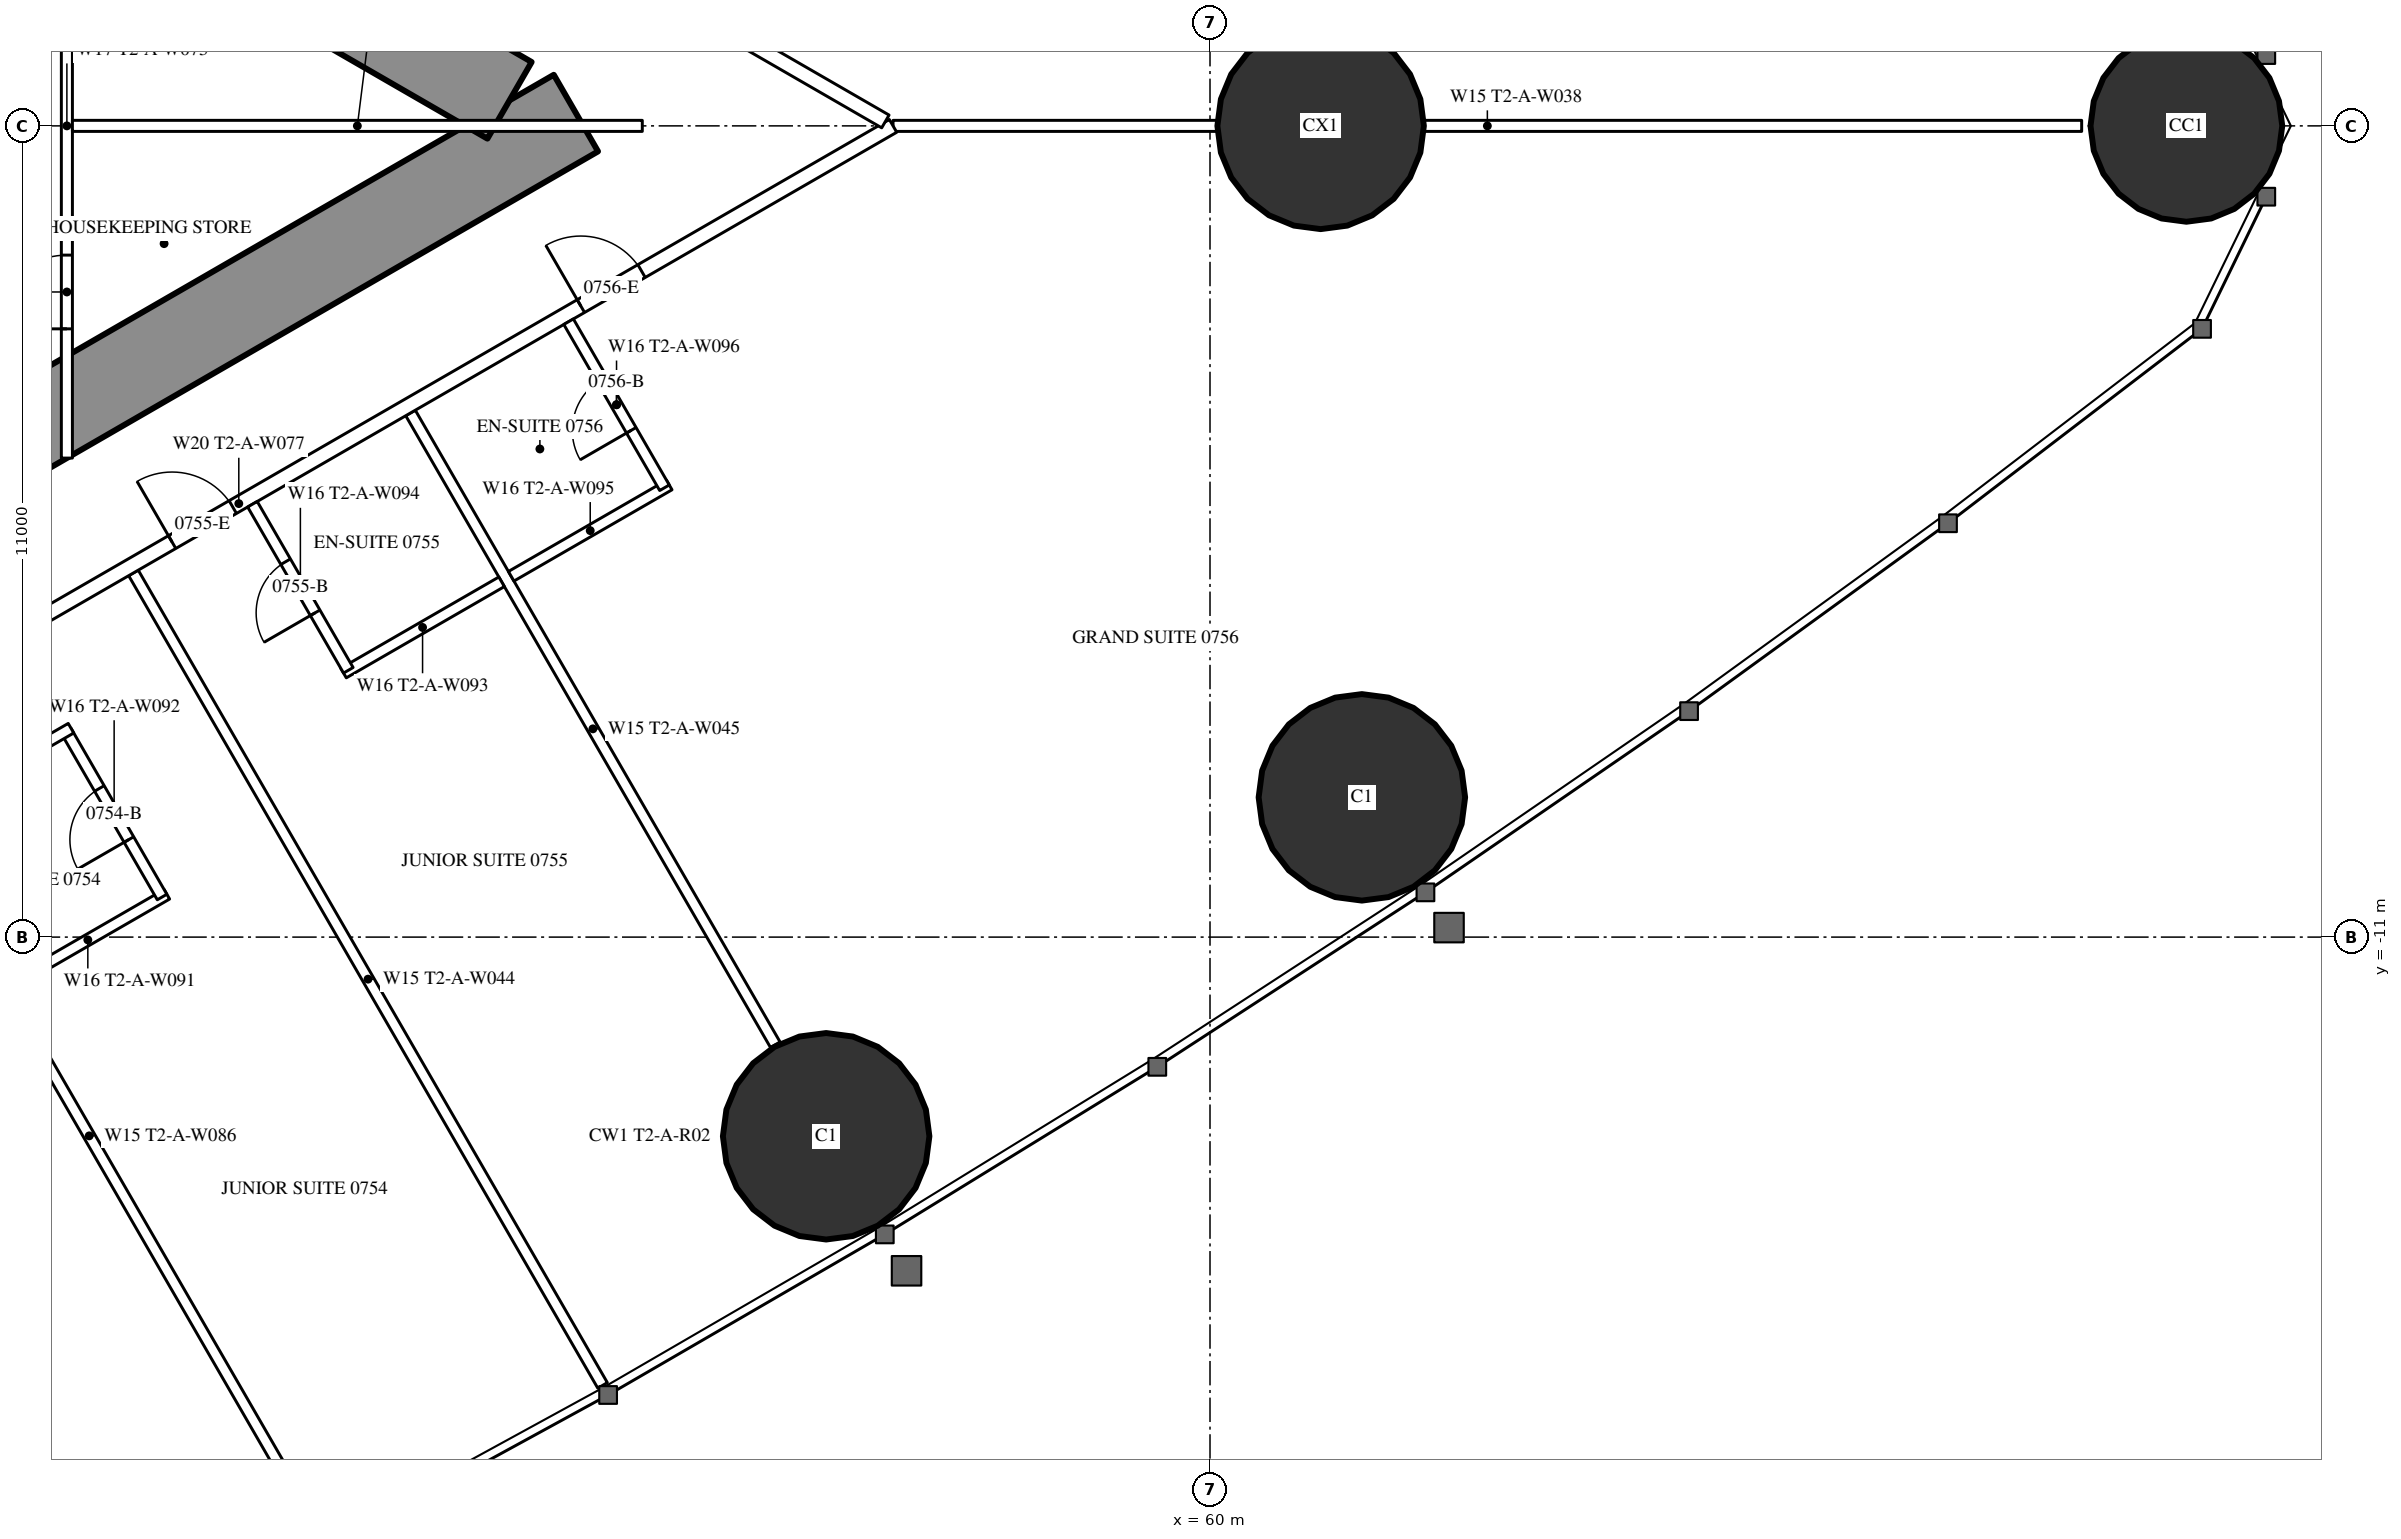
"""IFC4 building model, lengths in metres.
Left out: names, types, materials, properties, quantities, classifications, styles, units other than length and angle.
Written with IfcOpenShell. Run it as: python <this file> out.ifc"""

import sys

from ifc_helpers import new_model, si_unit, direction, frame, frame_2d, origin, origin_2d, place, context, subcontext, project, spatial, rectangle, hollow_circle, extrude, element, fill, save


model = new_model("IFC4")
c1 = context("Model", 3, precision=1e-05, world=origin(), true_north=direction((0.0, 1.0)))
c2 = subcontext(c1, "Body", "Model", "MODEL_VIEW")
j1 = project(units=[si_unit("LENGTHUNIT", "METRE"), si_unit("PLANEANGLEUNIT", "RADIAN")], contexts=[c1])
p1 = place(None, origin())
s1 = spatial("IfcSite", under=j1, at=p1, CompositionType="ELEMENT")
p2 = place(p1, origin())
s2 = spatial("IfcBuilding", under=s1, at=p2, CompositionType="ELEMENT")
p3 = place(p2, frame((0.0, 0.0, 32.0)))
s3 = spatial("IfcBuildingStorey", under=s2, at=p3, CompositionType="ELEMENT", Elevation=32.0)
p4 = place(p3, frame((73.239, 0.0, 0.0), z_axis=(0.0, 0.0, 1.0), x_axis=(1.0, 0.0, 0.0)))
e1 = element("IfcColumn", 1, at=p4, inside=s3, PredefinedType="COLUMN", context=c2, shape_type="SweptSolid", body=[
    extrude(hollow_circle(Radius=1.3, WallThickness=0.1, at=origin_2d()), origin(), (0.0, 0.0, 1.0), 3.5),
])
for number, where, z_axis, x_axis in (
    (2, (54.795, -13.701, 0.0), (0.0, 0.0, 1.0), (1.0, 0.0, 0.0)),
    (3, (62.059, -9.105, 0.0), (0.0, 0.0, 1.0), (1.0, 0.0, 0.0)),
):
    element("IfcColumn", number, at=place(p3, frame(where, z_axis=z_axis, x_axis=x_axis)), inside=s3, PredefinedType="COLUMN", context=c2, shape_type="SweptSolid", body=[
        extrude(hollow_circle(Radius=1.4, WallThickness=0.12, at=origin_2d()), origin(), (0.0, 0.0, 1.0), 3.5),
    ])
p5 = place(p3, frame((61.5, 0.0, 0.0), z_axis=(0.0, 0.0, 1.0), x_axis=(1.0, 0.0, 0.0)))
e4 = element("IfcColumn", 4, at=p5, inside=s3, PredefinedType="COLUMN", context=c2, shape_type="SweptSolid", body=[
    extrude(hollow_circle(Radius=1.4, WallThickness=0.1, at=origin_2d()), origin(), (0.0, 0.0, 1.0), 3.5),
])
p6 = place(p3, frame((27.2, -13.8, 0.0), z_axis=(0.0, 0.0, 1.0), x_axis=(0.866027159892, 0.499996958321, 0.0)))
e5 = element("IfcWall", 5, at=p6, inside=s3, PredefinedType="SHEAR", context=c2, shape_type="SweptSolid", body=[
    extrude(rectangle(XDim=27.947, YDim=1.2, at=frame_2d((13.973, 0.0))), origin(), (0.0, 0.0, 1.0), 3.5),
])
p7 = place(p6, frame((4.6, 0.0, 0.0)))
e6 = element("IfcOpeningElement", 6, at=p7, cuts=e5, PredefinedType="OPENING", context=c2, shape_type="SweptSolid", body=[
    extrude(rectangle(XDim=1.0, YDim=2.2, at=frame_2d((0.5, 1.1))), frame((0.0, 0.61, 0.0), z_axis=(0.0, -1.0, 0.0), x_axis=(1.0, 0.0, 0.0)), (0.0, 0.0, 1.0), 1.22),
])
p8 = place(p6, frame((13.395, 0.0, 0.0)))
e7 = element("IfcOpeningElement", 7, at=p8, cuts=e5, PredefinedType="OPENING", context=c2, shape_type="SweptSolid", body=[
    extrude(rectangle(XDim=1.8, YDim=2.2, at=frame_2d((0.9, 1.1))), frame((0.0, 0.61, 0.0), z_axis=(0.0, -1.0, 0.0), x_axis=(1.0, 0.0, 0.0)), (0.0, 0.0, 1.0), 1.22),
])
p9 = place(p3, frame((27.2, 13.8, 0.0), z_axis=(0.0, 0.0, 1.0), x_axis=(0.866024515034, -0.500001539357, 0.0)))
e8 = element("IfcWall", 8, at=p9, inside=s3, PredefinedType="SHEAR", context=c2, shape_type="SweptSolid", body=[
    extrude(rectangle(XDim=26.907, YDim=1.2, at=frame_2d((13.454, 0.0))), origin(), (0.0, 0.0, 1.0), 3.5),
])
p10 = place(p9, frame((4.6, 0.0, 0.0)))
e9 = element("IfcOpeningElement", 9, at=p10, cuts=e8, PredefinedType="OPENING", context=c2, shape_type="SweptSolid", body=[
    extrude(rectangle(XDim=1.0, YDim=2.2, at=frame_2d((0.5, 1.1))), frame((0.0, 0.61, 0.0), z_axis=(0.0, -1.0, 0.0), x_axis=(1.0, 0.0, 0.0)), (0.0, 0.0, 1.0), 1.22),
])
p11 = place(p9, frame((13.395, 0.0, 0.0)))
e10 = element("IfcOpeningElement", 10, at=p11, cuts=e8, PredefinedType="OPENING", context=c2, shape_type="SweptSolid", body=[
    extrude(rectangle(XDim=1.8, YDim=2.2, at=frame_2d((0.9, 1.1))), frame((0.0, 0.61, 0.0), z_axis=(0.0, -1.0, 0.0), x_axis=(1.0, 0.0, 0.0)), (0.0, 0.0, 1.0), 1.22),
])
p12 = place(p3, frame((41.647, -8.23, 0.0), z_axis=(0.0, 0.0, 1.0), x_axis=(0.49998590462, -0.866033541603, 0.0)))
e11 = element("IfcWall", 11, at=p12, inside=s3, PredefinedType="PARTITIONING", context=c2, shape_type="SweptSolid", body=[
    extrude(rectangle(XDim=12.621, YDim=0.15, at=frame_2d((6.311, 0.0))), origin(), (0.0, 0.0, 1.0), 3.25),
])
p13 = place(p3, frame((45.403, -6.062, 0.0), z_axis=(0.0, 0.0, 1.0), x_axis=(0.500007077968, -0.866021317279, 0.0)))
e12 = element("IfcWall", 12, at=p13, inside=s3, PredefinedType="PARTITIONING", context=c2, shape_type="SweptSolid", body=[
    extrude(rectangle(XDim=12.721, YDim=0.15, at=frame_2d((6.361, 0.0))), origin(), (0.0, 0.0, 1.0), 3.25),
])
p14 = place(p3, frame((49.159, -3.893, 0.0), z_axis=(0.0, 0.0, 1.0), x_axis=(0.499998773722, -0.866026111775, 0.0)))
e13 = element("IfcWall", 13, at=p14, inside=s3, PredefinedType="PARTITIONING", context=c2, shape_type="SweptSolid", body=[
    extrude(rectangle(XDim=9.892, YDim=0.15, at=frame_2d((4.946, 0.0))), origin(), (0.0, 0.0, 1.0), 2.25),
])
p15 = place(p3, frame((55.702, 0.0, 0.0), z_axis=(0.0, 0.0, 1.0), x_axis=(1.0, 0.0, 0.0)))
e14 = element("IfcWall", 14, at=p15, inside=s3, PredefinedType="PARTITIONING", context=c2, shape_type="SweptSolid", body=[
    extrude(rectangle(XDim=16.117, YDim=0.15, at=frame_2d((8.059, 0.0))), origin(), (0.0, 0.0, 1.0), 2.25),
])
p16 = place(p3, frame((37.96, -10.243, 0.0), z_axis=(0.0, 0.0, 1.0), x_axis=(0.866026429433, 0.499998223521, 0.0)))
e15 = element("IfcWall", 15, at=p16, inside=s3, PredefinedType="PARTITIONING", context=c2, shape_type="SweptSolid", body=[
    extrude(rectangle(XDim=20.487, YDim=0.2, at=frame_2d((10.243, 0.0))), origin(), (0.0, 0.0, 1.0), 3.25),
])
p17 = place(p16, frame((4.575, 0.0, 0.0)))
e16 = element("IfcOpeningElement", 16, at=p17, cuts=e15, PredefinedType="OPENING", context=c2, shape_type="SweptSolid", body=[
    extrude(rectangle(XDim=0.95, YDim=2.2, at=frame_2d((0.475, 1.1))), frame((0.0, 0.11, 0.0), z_axis=(0.0, -1.0, 0.0), x_axis=(1.0, 0.0, 0.0)), (0.0, 0.0, 1.0), 0.22),
])
p18 = place(p16, frame((9.199, 0.0, 0.0)))
e17 = element("IfcOpeningElement", 17, at=p18, cuts=e15, PredefinedType="OPENING", context=c2, shape_type="SweptSolid", body=[
    extrude(rectangle(XDim=0.95, YDim=2.2, at=frame_2d((0.475, 1.1))), frame((0.0, 0.11, 0.0), z_axis=(0.0, -1.0, 0.0), x_axis=(1.0, 0.0, 0.0)), (0.0, 0.0, 1.0), 0.22),
])
p19 = place(p16, frame((15.599, 0.0, 0.0)))
e18 = element("IfcOpeningElement", 18, at=p19, cuts=e15, PredefinedType="OPENING", context=c2, shape_type="SweptSolid", body=[
    extrude(rectangle(XDim=0.95, YDim=2.2, at=frame_2d((0.475, 1.1))), frame((0.0, 0.11, 0.0), z_axis=(0.0, -1.0, 0.0), x_axis=(1.0, 0.0, 0.0)), (0.0, 0.0, 1.0), 0.22),
])
p20 = place(p16, frame((2.875, 0.0, 0.0)))
e19 = element("IfcOpeningElement", 19, at=p20, cuts=e15, PredefinedType="OPENING", context=c2, shape_type="SweptSolid", body=[
    extrude(rectangle(XDim=0.95, YDim=2.2, at=frame_2d((0.475, 1.1))), frame((0.0, 0.11, 0.0), z_axis=(0.0, -1.0, 0.0), x_axis=(1.0, 0.0, 0.0)), (0.0, 0.0, 1.0), 0.22),
])
p21 = place(p3, frame((41.619, 8.131, 0.0), z_axis=(0.0, 0.0, 1.0), x_axis=(0.86603245327, -0.499987789734, 0.0)))
e20 = element("IfcWall", 20, at=p21, inside=s3, PredefinedType="PARTITIONING", context=c2, shape_type="SweptSolid", body=[
    extrude(rectangle(XDim=16.142, YDim=0.2, at=frame_2d((8.071, 0.0))), origin(), (0.0, 0.0, 1.0), 3.25),
])
p22 = place(p21, frame((9.024, 0.0, 0.0)))
e21 = element("IfcOpeningElement", 21, at=p22, cuts=e20, PredefinedType="OPENING", context=c2, shape_type="SweptSolid", body=[
    extrude(rectangle(XDim=0.95, YDim=2.2, at=frame_2d((0.475, 1.1))), frame((0.0, 0.11, 0.0), z_axis=(0.0, -1.0, 0.0), x_axis=(1.0, 0.0, 0.0)), (0.0, 0.0, 1.0), 0.22),
])
p23 = place(p21, frame((7.037, 0.0, 0.0)))
e22 = element("IfcOpeningElement", 22, at=p23, cuts=e20, PredefinedType="OPENING", context=c2, shape_type="SweptSolid", body=[
    extrude(rectangle(XDim=0.95, YDim=2.2, at=frame_2d((0.475, 1.1))), frame((0.0, 0.11, 0.0), z_axis=(0.0, -1.0, 0.0), x_axis=(1.0, 0.0, 0.0)), (0.0, 0.0, 1.0), 0.22),
])
p24 = place(p21, frame((2.987, 0.0, 0.0)))
e23 = element("IfcOpeningElement", 23, at=p24, cuts=e20, PredefinedType="OPENING", context=c2, shape_type="SweptSolid", body=[
    extrude(rectangle(XDim=0.95, YDim=2.2, at=frame_2d((0.475, 1.1))), frame((0.0, 0.11, 0.0), z_axis=(0.0, -1.0, 0.0), x_axis=(1.0, 0.0, 0.0)), (0.0, 0.0, 1.0), 0.22),
])
p25 = place(p3, frame((43.712, -11.657, 0.0), z_axis=(0.0, 0.0, 1.0), x_axis=(0.866006523861, 0.500032699561, 0.0)))
e24 = element("IfcWall", 24, at=p25, inside=s3, PredefinedType="PARTITIONING", context=c2, shape_type="SweptSolid", body=[
    extrude(rectangle(XDim=2.475, YDim=0.15, at=frame_2d((1.237, 0.0))), origin(), (0.0, 0.0, 1.0), 3.25),
])
p26 = place(p3, frame((44.491, -8.205, 0.0), z_axis=(0.0, 0.0, 1.0), x_axis=(0.500047596559, -0.865997922154, 0.0)))
e25 = element("IfcWall", 25, at=p26, inside=s3, PredefinedType="PARTITIONING", context=c2, shape_type="SweptSolid", body=[
    extrude(rectangle(XDim=2.6, YDim=0.15, at=frame_2d((1.3, 0.0))), origin(), (0.0, 0.0, 1.0), 3.25),
])
p27 = place(p26, frame((0.9, 0.0, 0.0)))
e26 = element("IfcOpeningElement", 26, at=p27, cuts=e25, PredefinedType="OPENING", context=c2, shape_type="SweptSolid", body=[
    extrude(rectangle(XDim=0.8, YDim=2.2, at=frame_2d((0.4, 1.1))), frame((0.0, 0.085, 0.0), z_axis=(0.0, -1.0, 0.0), x_axis=(1.0, 0.0, 0.0)), (0.0, 0.0, 1.0), 0.17),
])
for number, where, z_axis, x_axis in (
    (27, (42.412, -9.405, 0.0), (0.0, 0.0, 1.0), (0.866, 0.5, 0.0)),
    (28, (48.251, -7.42, 0.0), (0.0, 0.0, 1.0), (0.866, 0.5, 0.0)),
):
    element("IfcWall", number, at=place(p3, frame(where, z_axis=z_axis, x_axis=x_axis)), inside=s3, PredefinedType="PARTITIONING", context=c2, shape_type="SweptSolid", body=[
        extrude(rectangle(XDim=2.475, YDim=0.15, at=frame_2d((1.237, 0.0))), origin(), (0.0, 0.0, 1.0), 3.25),
    ])
p28 = place(p3, frame((47.016, -5.13, 0.0), z_axis=(0.0, 0.0, 1.0), x_axis=(0.500006934395, -0.866021400173, 0.0)))
e29 = element("IfcWall", 29, at=p28, inside=s3, PredefinedType="PARTITIONING", context=c2, shape_type="SweptSolid", body=[
    extrude(rectangle(XDim=2.6, YDim=0.15, at=frame_2d((1.3, 0.0))), origin(), (0.0, 0.0, 1.0), 3.25),
])
p29 = place(p28, frame((0.9, 0.0, 0.0)))
e30 = element("IfcOpeningElement", 30, at=p29, cuts=e29, PredefinedType="OPENING", context=c2, shape_type="SweptSolid", body=[
    extrude(rectangle(XDim=0.8, YDim=2.2, at=frame_2d((0.4, 1.1))), frame((0.0, 0.085, 0.0), z_axis=(0.0, -1.0, 0.0), x_axis=(1.0, 0.0, 0.0)), (0.0, 0.0, 1.0), 0.17),
])
p30 = place(p3, frame((50.524, -6.107, 0.0), z_axis=(0.0, 0.0, 1.0), x_axis=(0.866031185235, 0.4999899861, 0.0)))
e31 = element("IfcWall", 31, at=p30, inside=s3, PredefinedType="PARTITIONING", context=c2, shape_type="SweptSolid", body=[
    extrude(rectangle(XDim=2.475, YDim=0.15, at=frame_2d((1.238, 0.0))), origin(), (0.0, 0.0, 1.0), 3.25),
])
p31 = place(p3, frame((51.303, -2.656, 0.0), z_axis=(0.0, 0.0, 1.0), x_axis=(0.500047596559, -0.865997922154, 0.0)))
e32 = element("IfcWall", 32, at=p31, inside=s3, PredefinedType="PARTITIONING", context=c2, shape_type="SweptSolid", body=[
    extrude(rectangle(XDim=2.6, YDim=0.15, at=frame_2d((1.3, 0.0))), origin(), (0.0, 0.0, 1.0), 3.25),
])
p32 = place(p31, frame((0.9, 0.0, 0.0)))
e33 = element("IfcOpeningElement", 33, at=p32, cuts=e32, PredefinedType="OPENING", context=c2, shape_type="SweptSolid", body=[
    extrude(rectangle(XDim=0.8, YDim=2.2, at=frame_2d((0.4, 1.1))), frame((0.0, 0.085, 0.0), z_axis=(0.0, -1.0, 0.0), x_axis=(1.0, 0.0, 0.0)), (0.0, 0.0, 1.0), 0.17),
])
p33 = place(p3, frame((44.5, -4.505, 0.0), z_axis=(0.0, 0.0, 1.0), x_axis=(0.0, 1.0, 0.0)))
e34 = element("IfcWall", 34, at=p33, inside=s3, PredefinedType="PARTITIONING", context=c2, shape_type="SweptSolid", body=[
    extrude(rectangle(XDim=9.009, YDim=0.15, at=frame_2d((4.505, 0.0))), origin(), (0.0, 0.0, 1.0), 2.45),
])
p34 = place(p33, frame((1.752, 0.0, 0.0)))
e35 = element("IfcOpeningElement", 35, at=p34, cuts=e34, PredefinedType="OPENING", context=c2, shape_type="SweptSolid", body=[
    extrude(rectangle(XDim=1.0, YDim=2.2, at=frame_2d((0.5, 1.1))), frame((0.0, 0.085, 0.0), z_axis=(0.0, -1.0, 0.0), x_axis=(1.0, 0.0, 0.0)), (0.0, 0.0, 1.0), 0.17),
])
p35 = place(p33, frame((6.257, 0.0, 0.0)))
e36 = element("IfcOpeningElement", 36, at=p35, cuts=e34, PredefinedType="OPENING", context=c2, shape_type="SweptSolid", body=[
    extrude(rectangle(XDim=1.0, YDim=2.2, at=frame_2d((0.5, 1.1))), frame((0.0, 0.085, 0.0), z_axis=(0.0, -1.0, 0.0), x_axis=(1.0, 0.0, 0.0)), (0.0, 0.0, 1.0), 0.17),
])
p36 = place(p3, frame((44.575, 0.0, 0.0), z_axis=(0.0, 0.0, 1.0), x_axis=(1.0, 0.0, 0.0)))
e37 = element("IfcWall", 37, at=p36, inside=s3, PredefinedType="PARTITIONING", context=c2, shape_type="SweptSolid", body=[
    extrude(rectangle(XDim=7.727, YDim=0.15, at=frame_2d((3.864, 0.0))), origin(), (0.0, 0.0, 1.0), 2.25),
])
p37 = place(p27, origin())
e38 = element("IfcDoor", 38, at=p37, inside=s3, OperationType="SINGLE_SWING_RIGHT", PredefinedType="DOOR", context=c2, shape_type="SweptSolid", body=[
    extrude(rectangle(XDim=0.8, YDim=2.2, at=frame_2d((0.4, 1.1))), frame((0.0, 0.025, 0.0), z_axis=(0.0, -1.0, 0.0), x_axis=(1.0, 0.0, 0.0)), (0.0, 0.0, 1.0), 0.05),
])
fill(e26, e38)
p38 = place(p29, origin())
e39 = element("IfcDoor", 39, at=p38, inside=s3, OperationType="SINGLE_SWING_RIGHT", PredefinedType="DOOR", context=c2, shape_type="SweptSolid", body=[
    extrude(rectangle(XDim=0.8, YDim=2.2, at=frame_2d((0.4, 1.1))), frame((0.0, 0.025, 0.0), z_axis=(0.0, -1.0, 0.0), x_axis=(1.0, 0.0, 0.0)), (0.0, 0.0, 1.0), 0.05),
])
fill(e30, e39)
p39 = place(p18, origin())
e40 = element("IfcDoor", 40, at=p39, inside=s3, OperationType="SINGLE_SWING_LEFT", PredefinedType="DOOR", context=c2, shape_type="SweptSolid", body=[
    extrude(rectangle(XDim=0.95, YDim=2.2, at=frame_2d((0.475, 1.1))), frame((0.0, 0.025, 0.0), z_axis=(0.0, -1.0, 0.0), x_axis=(1.0, 0.0, 0.0)), (0.0, 0.0, 1.0), 0.05),
])
fill(e17, e40)
p40 = place(p32, origin())
e41 = element("IfcDoor", 41, at=p40, inside=s3, OperationType="SINGLE_SWING_RIGHT", PredefinedType="DOOR", context=c2, shape_type="SweptSolid", body=[
    extrude(rectangle(XDim=0.8, YDim=2.2, at=frame_2d((0.4, 1.1))), frame((0.0, 0.025, 0.0), z_axis=(0.0, -1.0, 0.0), x_axis=(1.0, 0.0, 0.0)), (0.0, 0.0, 1.0), 0.05),
])
fill(e33, e41)
p41 = place(p19, origin())
e42 = element("IfcDoor", 42, at=p41, inside=s3, OperationType="SINGLE_SWING_LEFT", PredefinedType="DOOR", context=c2, shape_type="SweptSolid", body=[
    extrude(rectangle(XDim=0.95, YDim=2.2, at=frame_2d((0.475, 1.1))), frame((0.0, 0.025, 0.0), z_axis=(0.0, -1.0, 0.0), x_axis=(1.0, 0.0, 0.0)), (0.0, 0.0, 1.0), 0.05),
])
fill(e18, e42)
p42 = place(p34, origin())
e43 = element("IfcDoor", 43, at=p42, inside=s3, OperationType="SINGLE_SWING_LEFT", PredefinedType="DOOR", context=c2, shape_type="SweptSolid", body=[
    extrude(rectangle(XDim=1.0, YDim=2.2, at=frame_2d((0.5, 1.1))), frame((0.0, 0.025, 0.0), z_axis=(0.0, -1.0, 0.0), x_axis=(1.0, 0.0, 0.0)), (0.0, 0.0, 1.0), 0.05),
])
fill(e35, e43)
save(model, sys.argv[1])
